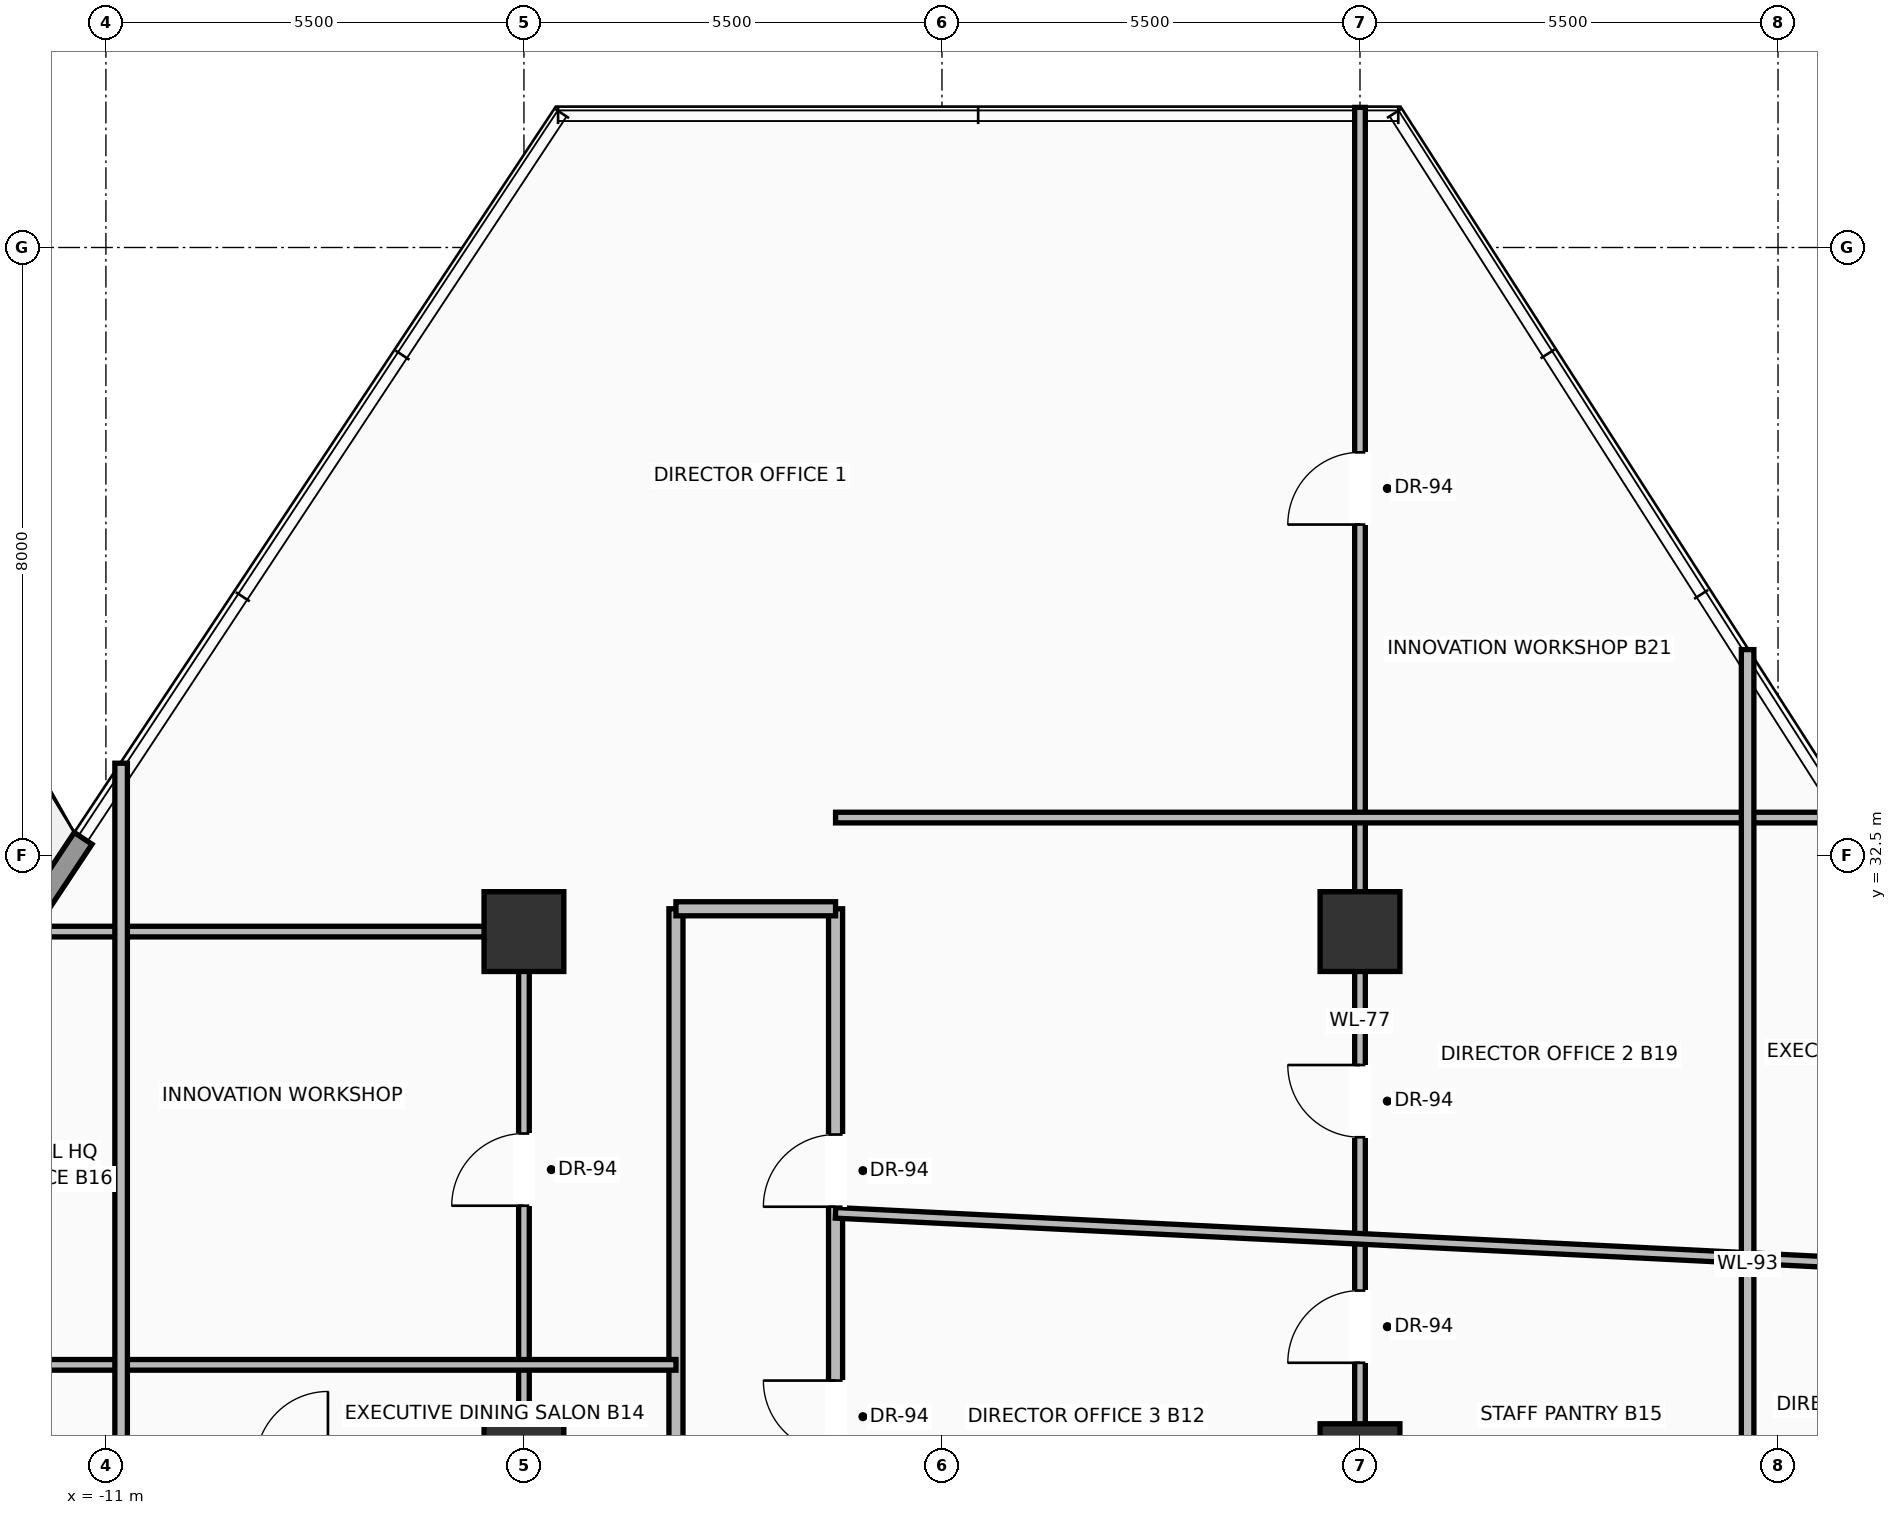
"""IFC4 building model, lengths in metres.
Left out: names, types, materials, properties, quantities, classifications, styles, units other than length and angle.
Written with IfcOpenShell. Run it as: python <this file> out.ifc"""

import sys

from ifc_helpers import new_model, si_unit, direction, frame, frame_2d, origin, origin_2d, place, context, subcontext, project, spatial, rectangle, extrude, source, transform, mapped, element, fill, save


model = new_model("IFC4")
c1 = context("Model", 3, precision=1e-05, world=origin(), true_north=direction((0.0, 1.0)))
c2 = subcontext(c1, "Body", "Model", "MODEL_VIEW")
j1 = project(units=[si_unit("LENGTHUNIT", "METRE"), si_unit("PLANEANGLEUNIT", "RADIAN")], contexts=[c1])
p1 = place(None, origin())
s1 = spatial("IfcSite", under=j1, at=p1, CompositionType="ELEMENT")
p2 = place(p1, origin())
s2 = spatial("IfcBuilding", under=s1, at=p2, CompositionType="ELEMENT")
p3 = place(p2, frame((0.0, 0.0, 117.3)))
s3 = spatial("IfcBuildingStorey", under=s2, at=p3, CompositionType="ELEMENT", Elevation=117.3)
m1 = source(origin(), c2, "Body", "SweptSolid", [
    extrude(rectangle(XDim=1.05, YDim=1.05, at=origin_2d()), origin(), (0.0, 0.0, 1.0), 3.7),
])
for number, where, z_axis, x_axis in (
    (1, (-5.5, 24.5, 0.0), (0.0, 0.0, 1.0), (1.0, 0.0, 0.0)),
    (2, (5.5, 24.5, 0.0), (0.0, 0.0, 1.0), (1.0, 0.0, 0.0)),
    (3, (-5.5, 31.5, 0.0), (0.0, 0.0, 1.0), (1.0, 0.0, 0.0)),
    (4, (5.5, 31.5, 0.0), (0.0, 0.0, 1.0), (1.0, 0.0, 0.0)),
):
    element("IfcColumn", number, at=place(p3, frame(where, z_axis=z_axis, x_axis=x_axis)), inside=s3, PredefinedType="COLUMN", context=c2, shape_type="MappedRepresentation", body=[
        mapped(m1, transform((0.0, 0.0, 0.0), scale=1.0)),
    ])
p4 = place(p3, frame((-21.256, 17.72, 0.0), z_axis=(0.0, 0.0, 1.0), x_axis=(0.552837339674, 0.833289191015, 0.0)))
e5 = element("IfcWall", 5, at=p4, inside=s3, PredefinedType="SOLIDWALL", context=c2, shape_type="SweptSolid", body=[
    extrude(rectangle(XDim=18.009, YDim=0.28, at=frame_2d((9.004, 0.0))), origin(), (0.0, 0.0, 1.0), 3.0),
])
p5 = place(p4, frame((4.322, 0.0, 0.0)))
e6 = element("IfcOpeningElement", 6, at=p5, cuts=e5, PredefinedType="OPENING", context=c2, shape_type="SweptSolid", body=[
    extrude(rectangle(XDim=1.6, YDim=2.35, at=frame_2d((0.8, 1.175))), frame((0.0, 0.15, 0.0), z_axis=(0.0, -1.0, 0.0), x_axis=(1.0, 0.0, 0.0)), (0.0, 0.0, 1.0), 0.3),
])
p6 = place(p4, frame((12.246, 0.0, 0.9)))
e7 = element("IfcOpeningElement", 7, at=p6, cuts=e5, PredefinedType="OPENING", context=c2, shape_type="SweptSolid", body=[
    extrude(rectangle(XDim=1.55, YDim=1.85, at=frame_2d((0.775, 0.925))), frame((0.0, 0.15, 0.0), z_axis=(0.0, -1.0, 0.0), x_axis=(1.0, 0.0, 0.0)), (0.0, 0.0, 1.0), 0.3),
])
p7 = place(p3, frame((-3.5, 19.05, 0.0), z_axis=(0.0, 0.0, 1.0), x_axis=(0.0, 1.0, 0.0)))
e8 = element("IfcWall", 8, at=p7, inside=s3, PredefinedType="PARTITIONING", context=c2, shape_type="SweptSolid", body=[
    extrude(rectangle(XDim=12.75, YDim=0.185, at=frame_2d((6.375, 0.0))), origin(), (0.0, 0.0, 1.0), 2.717),
])
p8 = place(p7, frame((3.486, 0.0, 0.0)))
e9 = element("IfcOpeningElement", 9, at=p8, cuts=e8, PredefinedType="OPENING", context=c2, shape_type="SweptSolid", body=[
    extrude(rectangle(XDim=0.95, YDim=2.2, at=frame_2d((0.475, 1.1))), frame((0.0, 0.103, 0.0), z_axis=(0.0, -1.0, 0.0), x_axis=(1.0, 0.0, 0.0)), (0.0, 0.0, 1.0), 0.205),
])
p9 = place(p3, frame((-1.4, 19.05, 0.0), z_axis=(0.0, 0.0, 1.0), x_axis=(0.0, 1.0, 0.0)))
e10 = element("IfcWall", 10, at=p9, inside=s3, PredefinedType="PARTITIONING", context=c2, shape_type="SweptSolid", body=[
    extrude(rectangle(XDim=12.75, YDim=0.185, at=frame_2d((6.375, 0.0))), origin(), (0.0, 0.0, 1.0), 2.717),
])
p10 = place(p9, frame((8.83, 0.0, 0.0)))
e11 = element("IfcOpeningElement", 11, at=p10, cuts=e10, PredefinedType="OPENING", context=c2, shape_type="SweptSolid", body=[
    extrude(rectangle(XDim=0.95, YDim=2.2, at=frame_2d((0.475, 1.1))), frame((0.0, 0.103, 0.0), z_axis=(0.0, -1.0, 0.0), x_axis=(1.0, 0.0, 0.0)), (0.0, 0.0, 1.0), 0.205),
])
p11 = place(p9, frame((5.593, 0.0, 0.0)))
e12 = element("IfcOpeningElement", 12, at=p11, cuts=e10, PredefinedType="OPENING", context=c2, shape_type="SweptSolid", body=[
    extrude(rectangle(XDim=0.95, YDim=2.2, at=frame_2d((0.475, 1.1))), frame((0.0, 0.103, 0.0), z_axis=(0.0, -1.0, 0.0), x_axis=(1.0, 0.0, 0.0)), (0.0, 0.0, 1.0), 0.205),
])
p12 = place(p3, frame((-3.5, 31.8, 0.0), z_axis=(0.0, 0.0, 1.0), x_axis=(1.0, 0.0, 0.0)))
e13 = element("IfcWall", 13, at=p12, inside=s3, PredefinedType="PARTITIONING", context=c2, shape_type="SweptSolid", body=[
    extrude(rectangle(XDim=2.1, YDim=0.185, at=frame_2d((1.05, 0.0))), origin(), (0.0, 0.0, 1.0), 2.717),
])
p13 = place(p3, frame((5.5, 18.3, 0.0), z_axis=(0.0, 0.0, 1.0), x_axis=(0.0, 1.0, 0.0)))
e14 = element("IfcWall", 14, at=p13, inside=s3, PredefinedType="PARTITIONING", context=c2, shape_type="SweptSolid", body=[
    extrude(rectangle(XDim=24.043, YDim=0.14, at=frame_2d((12.022, 0.0))), origin(), (0.0, 0.0, 1.0), 2.717),
])
p14 = place(p13, frame((10.494, 0.0, 0.0)))
e15 = element("IfcOpeningElement", 15, at=p14, cuts=e14, PredefinedType="OPENING", context=c2, shape_type="SweptSolid", body=[
    extrude(rectangle(XDim=0.95, YDim=2.2, at=frame_2d((0.475, 1.1))), frame((0.0, 0.08, 0.0), z_axis=(0.0, -1.0, 0.0), x_axis=(1.0, 0.0, 0.0)), (0.0, 0.0, 1.0), 0.16),
])
p15 = place(p13, frame((18.555, 0.0, 0.0)))
e16 = element("IfcOpeningElement", 16, at=p15, cuts=e14, PredefinedType="OPENING", context=c2, shape_type="SweptSolid", body=[
    extrude(rectangle(XDim=0.95, YDim=2.2, at=frame_2d((0.475, 1.1))), frame((0.0, 0.08, 0.0), z_axis=(0.0, -1.0, 0.0), x_axis=(1.0, 0.0, 0.0)), (0.0, 0.0, 1.0), 0.16),
])
p16 = place(p13, frame((7.527, 0.0, 0.0)))
e17 = element("IfcOpeningElement", 17, at=p16, cuts=e14, PredefinedType="OPENING", context=c2, shape_type="SweptSolid", body=[
    extrude(rectangle(XDim=0.95, YDim=2.2, at=frame_2d((0.475, 1.1))), frame((0.0, 0.08, 0.0), z_axis=(0.0, -1.0, 0.0), x_axis=(1.0, 0.0, 0.0)), (0.0, 0.0, 1.0), 0.16),
])
p17 = place(p3, frame((-5.5, 24.5, 0.0), z_axis=(0.0, 0.0, 1.0), x_axis=(0.0, 1.0, 0.0)))
e18 = element("IfcWall", 18, at=p17, inside=s3, PredefinedType="PARTITIONING", context=c2, shape_type="SweptSolid", body=[
    extrude(rectangle(XDim=7.0, YDim=0.14, at=frame_2d((3.5, 0.0))), origin(), (0.0, 0.0, 1.0), 2.717),
])
p18 = place(p17, frame((3.393, 0.0, 0.0)))
e19 = element("IfcOpeningElement", 19, at=p18, cuts=e18, PredefinedType="OPENING", context=c2, shape_type="SweptSolid", body=[
    extrude(rectangle(XDim=0.95, YDim=2.2, at=frame_2d((0.475, 1.1))), frame((0.0, 0.08, 0.0), z_axis=(0.0, -1.0, 0.0), x_axis=(1.0, 0.0, 0.0)), (0.0, 0.0, 1.0), 0.16),
])
p19 = place(p3, frame((-12.27, 31.5, 0.0), z_axis=(0.0, 0.0, 1.0), x_axis=(1.0, 0.0, 0.0)))
e20 = element("IfcWall", 20, at=p19, inside=s3, PredefinedType="PARTITIONING", context=c2, shape_type="SweptSolid", body=[
    extrude(rectangle(XDim=6.77, YDim=0.14, at=frame_2d((3.385, 0.0))), origin(), (0.0, 0.0, 1.0), 2.717),
])
p20 = place(p3, frame((-16.051, 25.8, 0.0), z_axis=(0.0, 0.0, 1.0), x_axis=(1.0, 0.0, 0.0)))
e21 = element("IfcWall", 21, at=p20, inside=s3, PredefinedType="PARTITIONING", context=c2, shape_type="SweptSolid", body=[
    extrude(rectangle(XDim=12.551, YDim=0.14, at=frame_2d((6.275, 0.0))), origin(), (0.0, 0.0, 1.0), 2.717),
])
p21 = place(p20, frame((2.483, 0.0, 0.0)))
e22 = element("IfcOpeningElement", 22, at=p21, cuts=e21, PredefinedType="OPENING", context=c2, shape_type="SweptSolid", body=[
    extrude(rectangle(XDim=0.95, YDim=2.2, at=frame_2d((0.475, 1.1))), frame((0.0, 0.08, 0.0), z_axis=(0.0, -1.0, 0.0), x_axis=(1.0, 0.0, 0.0)), (0.0, 0.0, 1.0), 0.16),
])
p22 = place(p3, frame((-1.4, 27.8, 0.0), z_axis=(0.0, 0.0, 1.0), x_axis=(0.998773235939, -0.049517907586, 0.0)))
e23 = element("IfcWall", 23, at=p22, inside=s3, PredefinedType="PARTITIONING", context=c2, shape_type="SweptSolid", body=[
    extrude(rectangle(XDim=17.32, YDim=0.14, at=frame_2d((8.66, 0.0))), origin(), (0.0, 0.0, 1.0), 2.717),
])
p23 = place(p22, frame((13.812, 0.0, 0.0)))
e24 = element("IfcOpeningElement", 24, at=p23, cuts=e23, PredefinedType="OPENING", context=c2, shape_type="SweptSolid", body=[
    extrude(rectangle(XDim=0.95, YDim=2.2, at=frame_2d((0.475, 1.1))), frame((0.0, 0.08, 0.0), z_axis=(0.0, -1.0, 0.0), x_axis=(1.0, 0.0, 0.0)), (0.0, 0.0, 1.0), 0.16),
])
p24 = place(p3, frame((-1.4, 33.0, 0.0), z_axis=(0.0, 0.0, 1.0), x_axis=(1.0, 0.0, 0.0)))
e25 = element("IfcWall", 25, at=p24, inside=s3, PredefinedType="PARTITIONING", context=c2, shape_type="SweptSolid", body=[
    extrude(rectangle(XDim=13.417, YDim=0.14, at=frame_2d((6.708, 0.0))), origin(), (0.0, 0.0, 1.0), 2.717),
])
p25 = place(p3, frame((-10.8, 19.05, 0.0), z_axis=(0.0, 0.0, 1.0), x_axis=(0.0, 1.0, 0.0)))
e26 = element("IfcWall", 26, at=p25, inside=s3, PredefinedType="PARTITIONING", context=c2, shape_type="SweptSolid", body=[
    extrude(rectangle(XDim=14.665, YDim=0.165, at=frame_2d((7.333, 0.0))), origin(), (0.0, 0.0, 1.0), 2.717),
])
p26 = place(p3, frame((10.6, 19.05, 0.0), z_axis=(0.0, 0.0, 1.0), x_axis=(0.0, 1.0, 0.0)))
e27 = element("IfcWall", 27, at=p26, inside=s3, PredefinedType="PARTITIONING", context=c2, shape_type="SweptSolid", body=[
    extrude(rectangle(XDim=16.16, YDim=0.165, at=frame_2d((8.08, 0.0))), origin(), (0.0, 0.0, 1.0), 2.717),
])
m2 = source(origin(), c2, "Body", "SweptSolid", [
    extrude(rectangle(XDim=0.95, YDim=2.2, at=frame_2d((0.475, 1.1))), frame((0.0, 0.025, 0.0), z_axis=(0.0, -1.0, 0.0), x_axis=(1.0, 0.0, 0.0)), (0.0, 0.0, 1.0), 0.05),
])
p27 = place(p10, origin())
e28 = element("IfcDoor", 28, at=p27, inside=s3, OperationType="SINGLE_SWING_LEFT", PredefinedType="DOOR", context=c2, shape_type="MappedRepresentation", body=[
    mapped(m2, transform((0.0, 0.0, 0.0), scale=1.0)),
])
fill(e11, e28)
p28 = place(p11, origin())
e29 = element("IfcDoor", 29, at=p28, inside=s3, OperationType="SINGLE_SWING_RIGHT", PredefinedType="DOOR", context=c2, shape_type="MappedRepresentation", body=[
    mapped(m2, transform((0.0, 0.0, 0.0), scale=1.0)),
])
fill(e12, e29)
p29 = place(p18, origin())
e30 = element("IfcDoor", 30, at=p29, inside=s3, OperationType="SINGLE_SWING_LEFT", PredefinedType="DOOR", context=c2, shape_type="MappedRepresentation", body=[
    mapped(m2, transform((0.0, 0.0, 0.0), scale=1.0)),
])
fill(e19, e30)
p30 = place(p14, origin())
e31 = element("IfcDoor", 31, at=p30, inside=s3, OperationType="SINGLE_SWING_RIGHT", PredefinedType="DOOR", context=c2, shape_type="MappedRepresentation", body=[
    mapped(m2, transform((0.0, 0.0, 0.0), scale=1.0)),
])
fill(e15, e31)
p31 = place(p15, origin())
e32 = element("IfcDoor", 32, at=p31, inside=s3, OperationType="SINGLE_SWING_LEFT", PredefinedType="DOOR", context=c2, shape_type="MappedRepresentation", body=[
    mapped(m2, transform((0.0, 0.0, 0.0), scale=1.0)),
])
fill(e16, e32)
p32 = place(p16, origin())
e33 = element("IfcDoor", 33, at=p32, inside=s3, OperationType="SINGLE_SWING_LEFT", PredefinedType="DOOR", context=c2, shape_type="MappedRepresentation", body=[
    mapped(m2, transform((0.0, 0.0, 0.0), scale=1.0)),
])
fill(e17, e33)
save(model, sys.argv[1])
